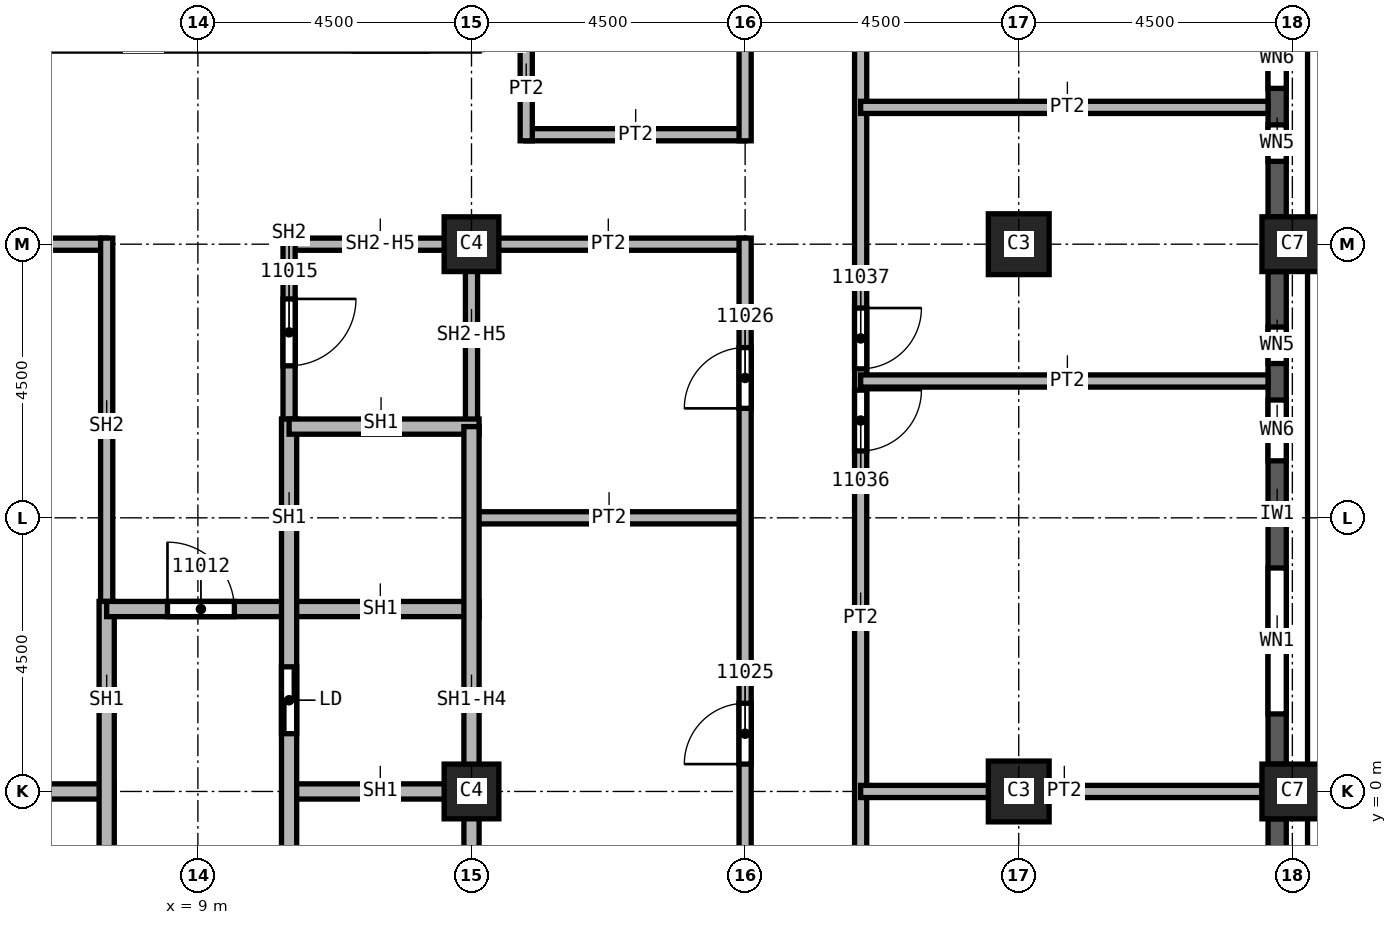
"""IFC4 building model, lengths in metres.
Left out: names, types, materials, properties, quantities, classifications, styles, units other than length and angle.
Written with IfcOpenShell. Run it as: python <this file> out.ifc"""

import sys

from ifc_helpers import new_model, si_unit, direction, frame, frame_2d, origin, origin_2d, place, context, subcontext, project, spatial, rectangle, extrude, element, fill, save


model = new_model("IFC4")
c1 = context("Model", 3, precision=1e-05, world=origin(), true_north=direction((0.0, 1.0)))
c2 = subcontext(c1, "Body", "Model", "MODEL_VIEW")
j1 = project(units=[si_unit("LENGTHUNIT", "METRE"), si_unit("PLANEANGLEUNIT", "RADIAN")], contexts=[c1])
p1 = place(None, origin())
s1 = spatial("IfcSite", under=j1, at=p1, CompositionType="ELEMENT")
p2 = place(p1, origin())
s2 = spatial("IfcBuilding", under=s1, at=p2, CompositionType="ELEMENT")
p3 = place(p2, frame((0.0, 0.0, 184.0)))
s3 = spatial("IfcBuildingStorey", under=s2, at=p3, CompositionType="ELEMENT", Elevation=184.0)
for number, where, z_axis, x_axis in (
    (1, (22.5, 0.0, 0.0), (0.0, 0.0, 1.0), (1.0, 0.0, 0.0)),
    (2, (22.5, 9.0, 0.0), (0.0, 0.0, 1.0), (1.0, 0.0, 0.0)),
):
    element("IfcColumn", number, at=place(p3, frame(where, z_axis=z_axis, x_axis=x_axis)), inside=s3, PredefinedType="COLUMN", context=c2, shape_type="SweptSolid", body=[
        extrude(rectangle(XDim=1.0, YDim=1.0, at=origin_2d()), origin(), (0.0, 0.0, 1.0), 3.72),
    ])
for number, where, z_axis, x_axis in (
    (3, (13.5, 0.0, 0.0), (0.0, 0.0, 1.0), (1.0, 0.0, 0.0)),
    (4, (13.5, 9.0, 0.0), (0.0, 0.0, 1.0), (1.0, 0.0, 0.0)),
):
    element("IfcColumn", number, at=place(p3, frame(where, z_axis=z_axis, x_axis=x_axis)), inside=s3, PredefinedType="COLUMN", context=c2, shape_type="SweptSolid", body=[
        extrude(rectangle(XDim=0.9, YDim=0.9, at=origin_2d()), origin(), (0.0, 0.0, 1.0), 3.72),
    ])
for number, where, z_axis, x_axis in (
    (5, (27.0, 0.0, 0.0), (0.0, 0.0, 1.0), (0.0, 1.0, 0.0)),
    (6, (27.0, 9.0, 0.0), (0.0, 0.0, 1.0), (0.0, 1.0, 0.0)),
):
    element("IfcColumn", number, at=place(p3, frame(where, z_axis=z_axis, x_axis=x_axis)), inside=s3, PredefinedType="COLUMN", context=c2, shape_type="SweptSolid", body=[
        extrude(rectangle(XDim=0.9, YDim=1.0, at=origin_2d()), origin(), (0.0, 0.0, 1.0), 3.72),
    ])
p4 = place(p3, frame((26.75, -0.45, 0.0), z_axis=(0.0, 0.0, 1.0), x_axis=(0.0, -1.0, 0.0)))
e7 = element("IfcWall", 7, at=p4, inside=s3, PredefinedType="SOLIDWALL", context=c2, shape_type="SweptSolid", body=[
    extrude(rectangle(XDim=8.1, YDim=0.3, at=frame_2d((4.05, 0.0))), origin(), (0.0, 0.0, 1.0), 3.12),
])
p5 = place(p4, frame((3.45, 0.0, 0.0)))
e8 = element("IfcOpeningElement", 8, at=p5, cuts=e7, PredefinedType="OPENING", context=c2, shape_type="SweptSolid", body=[
    extrude(rectangle(XDim=1.2, YDim=2.4, at=frame_2d((0.6, 1.2))), frame((0.0, 0.15, 0.0), z_axis=(0.0, -1.0, 0.0), x_axis=(1.0, 0.0, 0.0)), (0.0, 0.0, 1.0), 0.3),
])
p6 = place(p3, frame((26.75, 0.45, 0.0), z_axis=(0.0, 0.0, 1.0), x_axis=(0.0, 1.0, 0.0)))
e9 = element("IfcWall", 9, at=p6, inside=s3, PredefinedType="SOLIDWALL", context=c2, shape_type="SweptSolid", body=[
    extrude(rectangle(XDim=8.1, YDim=0.3, at=frame_2d((4.05, 0.0))), origin(), (0.0, 0.0, 1.0), 3.12),
])
p7 = place(p6, frame((0.825, 0.0, 0.8)))
e10 = element("IfcOpeningElement", 10, at=p7, cuts=e9, PredefinedType="OPENING", context=c2, shape_type="SweptSolid", body=[
    extrude(rectangle(XDim=2.4, YDim=1.95, at=frame_2d((1.2, 0.975))), frame((0.0, 0.15, 0.0), z_axis=(0.0, -1.0, 0.0), x_axis=(1.0, 0.0, 0.0)), (0.0, 0.0, 1.0), 0.3),
])
p8 = place(p6, frame((4.988, 0.0, 0.8)))
e11 = element("IfcOpeningElement", 11, at=p8, cuts=e9, PredefinedType="OPENING", context=c2, shape_type="SweptSolid", body=[
    extrude(rectangle(XDim=1.0, YDim=1.95, at=frame_2d((0.5, 0.975))), frame((0.0, 0.15, 0.0), z_axis=(0.0, -1.0, 0.0), x_axis=(1.0, 0.0, 0.0)), (0.0, 0.0, 1.0), 0.3),
])
p9 = place(p6, frame((6.587, 0.0, 0.8)))
e12 = element("IfcOpeningElement", 12, at=p9, cuts=e9, PredefinedType="OPENING", context=c2, shape_type="SweptSolid", body=[
    extrude(rectangle(XDim=0.6, YDim=1.95, at=frame_2d((0.3, 0.975))), frame((0.0, 0.15, 0.0), z_axis=(0.0, -1.0, 0.0), x_axis=(1.0, 0.0, 0.0)), (0.0, 0.0, 1.0), 0.3),
])
p10 = place(p3, frame((26.75, 9.45, 0.0), z_axis=(0.0, 0.0, 1.0), x_axis=(0.0, 1.0, 0.0)))
e13 = element("IfcWall", 13, at=p10, inside=s3, PredefinedType="SOLIDWALL", context=c2, shape_type="SweptSolid", body=[
    extrude(rectangle(XDim=8.1, YDim=0.3, at=frame_2d((4.05, 0.0))), origin(), (0.0, 0.0, 1.0), 3.12),
])
p11 = place(p10, frame((4.875, 0.0, 0.8)))
e14 = element("IfcOpeningElement", 14, at=p11, cuts=e13, PredefinedType="OPENING", context=c2, shape_type="SweptSolid", body=[
    extrude(rectangle(XDim=2.4, YDim=1.95, at=frame_2d((1.2, 0.975))), frame((0.0, 0.15, 0.0), z_axis=(0.0, -1.0, 0.0), x_axis=(1.0, 0.0, 0.0)), (0.0, 0.0, 1.0), 0.3),
])
p12 = place(p10, frame((0.913, 0.0, 0.8)))
e15 = element("IfcOpeningElement", 15, at=p12, cuts=e13, PredefinedType="OPENING", context=c2, shape_type="SweptSolid", body=[
    extrude(rectangle(XDim=0.6, YDim=1.95, at=frame_2d((0.3, 0.975))), frame((0.0, 0.15, 0.0), z_axis=(0.0, -1.0, 0.0), x_axis=(1.0, 0.0, 0.0)), (0.0, 0.0, 1.0), 0.3),
])
p13 = place(p10, frame((2.113, 0.0, 0.8)))
e16 = element("IfcOpeningElement", 16, at=p13, cuts=e13, PredefinedType="OPENING", context=c2, shape_type="SweptSolid", body=[
    extrude(rectangle(XDim=1.0, YDim=1.95, at=frame_2d((0.5, 0.975))), frame((0.0, 0.15, 0.0), z_axis=(0.0, -1.0, 0.0), x_axis=(1.0, 0.0, 0.0)), (0.0, 0.0, 1.0), 0.3),
])
for number, where, z_axis, x_axis in (
    (17, (13.5, 4.5, 0.0), (0.0, 0.0, 1.0), (1.0, 0.0, 0.0)),
    (18, (18.0, 9.0, 0.0), (0.0, 0.0, 1.0), (-1.0, 0.0, 0.0)),
):
    element("IfcWall", number, at=place(p3, frame(where, z_axis=z_axis, x_axis=x_axis)), inside=s3, PredefinedType="PARTITIONING", context=c2, shape_type="SweptSolid", body=[
        extrude(rectangle(XDim=4.5, YDim=0.2, at=frame_2d((2.25, 0.0))), origin(), (0.0, 0.0, 1.0), 3.72),
    ])
p14 = place(p3, frame((14.4, 10.8, 0.0), z_axis=(0.0, 0.0, 1.0), x_axis=(1.0, 0.0, 0.0)))
e19 = element("IfcWall", 19, at=p14, inside=s3, PredefinedType="PARTITIONING", context=c2, shape_type="SweptSolid", body=[
    extrude(rectangle(XDim=3.6, YDim=0.2, at=frame_2d((1.8, 0.0))), origin(), (0.0, 0.0, 1.0), 3.72),
])
p15 = place(p3, frame((14.4, 12.3, 0.0), z_axis=(0.0, 0.0, 1.0), x_axis=(0.0, -1.0, 0.0)))
e20 = element("IfcWall", 20, at=p15, inside=s3, PredefinedType="PARTITIONING", context=c2, shape_type="SweptSolid", body=[
    extrude(rectangle(XDim=1.6, YDim=0.2, at=frame_2d((0.8, 0.0))), origin(), (0.0, 0.0, 1.0), 3.72),
])
p16 = place(p3, frame((18.0, -8.7, 0.0), z_axis=(0.0, 0.0, 1.0), x_axis=(0.0, 1.0, 0.0)))
e21 = element("IfcWall", 21, at=p16, inside=s3, PredefinedType="PARTITIONING", context=c2, shape_type="SweptSolid", body=[
    extrude(rectangle(XDim=17.8, YDim=0.2, at=frame_2d((8.9, 0.0))), origin(), (0.0, 0.0, 1.0), 3.72),
])
p17 = place(p16, frame((2.95, 0.0, 0.0)))
e22 = element("IfcOpeningElement", 22, at=p17, cuts=e21, PredefinedType="OPENING", context=c2, shape_type="SweptSolid", body=[
    extrude(rectangle(XDim=1.0, YDim=2.1, at=frame_2d((0.5, 1.05))), frame((0.0, 0.1, 0.0), z_axis=(0.0, -1.0, 0.0), x_axis=(1.0, 0.0, 0.0)), (0.0, 0.0, 1.0), 0.2),
])
p18 = place(p16, frame((9.15, 0.0, 0.0)))
e23 = element("IfcOpeningElement", 23, at=p18, cuts=e21, PredefinedType="OPENING", context=c2, shape_type="SweptSolid", body=[
    extrude(rectangle(XDim=1.0, YDim=2.1, at=frame_2d((0.5, 1.05))), frame((0.0, 0.1, 0.0), z_axis=(0.0, -1.0, 0.0), x_axis=(1.0, 0.0, 0.0)), (0.0, 0.0, 1.0), 0.2),
])
p19 = place(p16, frame((15.0, 0.0, 0.0)))
e24 = element("IfcOpeningElement", 24, at=p19, cuts=e21, PredefinedType="OPENING", context=c2, shape_type="SweptSolid", body=[
    extrude(rectangle(XDim=1.0, YDim=2.1, at=frame_2d((0.5, 1.05))), frame((0.0, 0.1, 0.0), z_axis=(0.0, -1.0, 0.0), x_axis=(1.0, 0.0, 0.0)), (0.0, 0.0, 1.0), 0.2),
])
p20 = place(p3, frame((18.0, 10.7, 0.0), z_axis=(0.0, 0.0, 1.0), x_axis=(0.0, 1.0, 0.0)))
e25 = element("IfcWall", 25, at=p20, inside=s3, PredefinedType="PARTITIONING", context=c2, shape_type="SweptSolid", body=[
    extrude(rectangle(XDim=11.6, YDim=0.2, at=frame_2d((5.8, 0.0))), origin(), (0.0, 0.0, 1.0), 3.72),
])
p21 = place(p20, frame((4.25, 0.0, 0.0)))
e26 = element("IfcOpeningElement", 26, at=p21, cuts=e25, PredefinedType="OPENING", context=c2, shape_type="SweptSolid", body=[
    extrude(rectangle(XDim=1.0, YDim=2.1, at=frame_2d((0.5, 1.05))), frame((0.0, 0.1, 0.0), z_axis=(0.0, -1.0, 0.0), x_axis=(1.0, 0.0, 0.0)), (0.0, 0.0, 1.0), 0.2),
])
p22 = place(p3, frame((19.9, 22.4, 0.0), z_axis=(0.0, 0.0, 1.0), x_axis=(0.0, -1.0, 0.0)))
e27 = element("IfcWall", 27, at=p22, inside=s3, PredefinedType="PARTITIONING", context=c2, shape_type="SweptSolid", body=[
    extrude(rectangle(XDim=31.1, YDim=0.2, at=frame_2d((15.55, 0.0))), origin(), (0.0, 0.0, 1.0), 3.72),
])
p23 = place(p22, frame((15.8, 0.0, 0.0)))
e28 = element("IfcOpeningElement", 28, at=p23, cuts=e27, PredefinedType="OPENING", context=c2, shape_type="SweptSolid", body=[
    extrude(rectangle(XDim=1.0, YDim=2.1, at=frame_2d((0.5, 1.05))), frame((0.0, 0.1, 0.0), z_axis=(0.0, -1.0, 0.0), x_axis=(1.0, 0.0, 0.0)), (0.0, 0.0, 1.0), 0.2),
])
p24 = place(p22, frame((14.45, 0.0, 0.0)))
e29 = element("IfcOpeningElement", 29, at=p24, cuts=e27, PredefinedType="OPENING", context=c2, shape_type="SweptSolid", body=[
    extrude(rectangle(XDim=1.0, YDim=2.1, at=frame_2d((0.5, 1.05))), frame((0.0, 0.1, 0.0), z_axis=(0.0, -1.0, 0.0), x_axis=(1.0, 0.0, 0.0)), (0.0, 0.0, 1.0), 0.2),
])
p25 = place(p22, frame((7.0, 0.0, 0.0)))
e30 = element("IfcOpeningElement", 30, at=p25, cuts=e27, PredefinedType="OPENING", context=c2, shape_type="SweptSolid", body=[
    extrude(rectangle(XDim=1.0, YDim=2.1, at=frame_2d((0.5, 1.05))), frame((0.0, 0.1, 0.0), z_axis=(0.0, -1.0, 0.0), x_axis=(1.0, 0.0, 0.0)), (0.0, 0.0, 1.0), 0.2),
])
p26 = place(p22, frame((27.05, 0.0, 0.0)))
e31 = element("IfcOpeningElement", 31, at=p26, cuts=e27, PredefinedType="OPENING", context=c2, shape_type="SweptSolid", body=[
    extrude(rectangle(XDim=1.0, YDim=2.1, at=frame_2d((0.5, 1.05))), frame((0.0, 0.1, 0.0), z_axis=(0.0, -1.0, 0.0), x_axis=(1.0, 0.0, 0.0)), (0.0, 0.0, 1.0), 0.2),
])
for number, where, z_axis, x_axis in (
    (32, (19.9, 6.75, 0.0), (0.0, 0.0, 1.0), (1.0, 0.0, 0.0)),
    (33, (19.9, 11.25, 0.0), (0.0, 0.0, 1.0), (1.0, 0.0, 0.0)),
):
    element("IfcWall", number, at=place(p3, frame(where, z_axis=z_axis, x_axis=x_axis)), inside=s3, PredefinedType="PARTITIONING", context=c2, shape_type="SweptSolid", body=[
        extrude(rectangle(XDim=6.7, YDim=0.2, at=frame_2d((3.35, 0.0))), origin(), (0.0, 0.0, 1.0), 3.72),
    ])
p27 = place(p3, frame((26.5, 0.0, 0.0), z_axis=(0.0, 0.0, 1.0), x_axis=(-1.0, 0.0, 0.0)))
e34 = element("IfcWall", 34, at=p27, inside=s3, PredefinedType="PARTITIONING", context=c2, shape_type="SweptSolid", body=[
    extrude(rectangle(XDim=6.6, YDim=0.2, at=frame_2d((3.3, 0.0))), origin(), (0.0, 0.0, 1.0), 3.72),
])
p28 = place(p3, frame((4.5, 9.0, 0.0), z_axis=(0.0, 0.0, 1.0), x_axis=(1.0, 0.0, 0.0)))
e35 = element("IfcWall", 35, at=p28, inside=s3, PredefinedType="SOLIDWALL", context=c2, shape_type="SweptSolid", body=[
    extrude(rectangle(XDim=3.0, YDim=0.2, at=frame_2d((1.5, 0.0))), origin(), (0.0, 0.0, 1.0), 2.958),
])
p29 = place(p3, frame((7.5, 9.1, 0.0), z_axis=(0.0, 0.0, 1.0), x_axis=(0.0, -1.0, 0.0)))
e36 = element("IfcWall", 36, at=p29, inside=s3, PredefinedType="SOLIDWALL", context=c2, shape_type="SweptSolid", body=[
    extrude(rectangle(XDim=6.225, YDim=0.2, at=frame_2d((3.113, 0.0))), origin(), (0.0, 0.0, 1.0), 3.72),
])
p30 = place(p3, frame((10.5, 9.0, 0.0), z_axis=(0.0, 0.0, 1.0), x_axis=(1.0, 0.0, 0.0)))
e37 = element("IfcWall", 37, at=p30, inside=s3, PredefinedType="SOLIDWALL", context=c2, shape_type="SweptSolid", body=[
    extrude(rectangle(XDim=3.1, YDim=0.2, at=frame_2d((1.55, 0.0))), origin(), (0.0, 0.0, 1.0), 2.958),
])
p31 = place(p3, frame((10.5, 9.1, 0.0), z_axis=(0.0, 0.0, 1.0), x_axis=(0.0, -1.0, 0.0)))
e38 = element("IfcWall", 38, at=p31, inside=s3, PredefinedType="SOLIDWALL", context=c2, shape_type="SweptSolid", body=[
    extrude(rectangle(XDim=3.225, YDim=0.2, at=frame_2d((1.613, 0.0))), origin(), (0.0, 0.0, 1.0), 3.72),
])
p32 = place(p31, frame((1.0, 0.0, 0.0)))
e39 = element("IfcOpeningElement", 39, at=p32, cuts=e38, PredefinedType="OPENING", context=c2, shape_type="SweptSolid", body=[
    extrude(rectangle(XDim=1.1, YDim=2.1, at=frame_2d((0.55, 1.05))), frame((0.0, 0.1, 0.0), z_axis=(0.0, -1.0, 0.0), x_axis=(1.0, 0.0, 0.0)), (0.0, 0.0, 1.0), 0.2),
])
p33 = place(p3, frame((13.5, 9.1, 0.0), z_axis=(0.0, 0.0, 1.0), x_axis=(0.0, -1.0, 0.0)))
e40 = element("IfcWall", 40, at=p33, inside=s3, PredefinedType="SOLIDWALL", context=c2, shape_type="SweptSolid", body=[
    extrude(rectangle(XDim=3.1, YDim=0.2, at=frame_2d((1.55, 0.0))), origin(), (0.0, 0.0, 1.0), 2.958),
])
p34 = place(p3, frame((4.375, 0.0, 0.0), z_axis=(0.0, 0.0, 1.0), x_axis=(1.0, 0.0, 0.0)))
e41 = element("IfcWall", 41, at=p34, inside=s3, PredefinedType="SOLIDWALL", context=c2, shape_type="SweptSolid", body=[
    extrude(rectangle(XDim=3.25, YDim=0.25, at=frame_2d((1.625, 0.0))), origin(), (0.0, 0.0, 1.0), 3.72),
])
p35 = place(p3, frame((7.5, 3.125, 0.0), z_axis=(0.0, 0.0, 1.0), x_axis=(0.0, -1.0, 0.0)))
e42 = element("IfcWall", 42, at=p35, inside=s3, PredefinedType="SOLIDWALL", context=c2, shape_type="SweptSolid", body=[
    extrude(rectangle(XDim=9.125, YDim=0.25, at=frame_2d((4.562, 0.0))), origin(), (0.0, 0.0, 1.0), 3.72),
])
p36 = place(p3, frame((7.5, 3.0, 0.0), z_axis=(0.0, 0.0, 1.0), x_axis=(1.0, 0.0, 0.0)))
e43 = element("IfcWall", 43, at=p36, inside=s3, PredefinedType="SOLIDWALL", context=c2, shape_type="SweptSolid", body=[
    extrude(rectangle(XDim=6.125, YDim=0.25, at=frame_2d((3.062, 0.0))), origin(), (0.0, 0.0, 1.0), 3.72),
])
p37 = place(p36, frame((1.0, 0.0, 0.0)))
e44 = element("IfcOpeningElement", 44, at=p37, cuts=e43, PredefinedType="OPENING", context=c2, shape_type="SweptSolid", body=[
    extrude(rectangle(XDim=1.1, YDim=2.1, at=frame_2d((0.55, 1.05))), frame((0.0, 0.125, 0.0), z_axis=(0.0, -1.0, 0.0), x_axis=(1.0, 0.0, 0.0)), (0.0, 0.0, 1.0), 0.25),
])
p38 = place(p3, frame((10.5, 0.0, 0.0), z_axis=(0.0, 0.0, 1.0), x_axis=(1.0, 0.0, 0.0)))
e45 = element("IfcWall", 45, at=p38, inside=s3, PredefinedType="SOLIDWALL", context=c2, shape_type="SweptSolid", body=[
    extrude(rectangle(XDim=3.125, YDim=0.25, at=frame_2d((1.562, 0.0))), origin(), (0.0, 0.0, 1.0), 3.72),
])
p39 = place(p3, frame((10.5, 6.125, 0.0), z_axis=(0.0, 0.0, 1.0), x_axis=(0.0, -1.0, 0.0)))
e46 = element("IfcWall", 46, at=p39, inside=s3, PredefinedType="SOLIDWALL", context=c2, shape_type="SweptSolid", body=[
    extrude(rectangle(XDim=9.25, YDim=0.25, at=frame_2d((4.625, 0.0))), origin(), (0.0, 0.0, 1.0), 3.72),
])
p40 = place(p39, frame((7.075, 0.0, 0.0)))
e47 = element("IfcOpeningElement", 47, at=p40, cuts=e46, PredefinedType="OPENING", context=c2, shape_type="SweptSolid", body=[
    extrude(rectangle(XDim=1.1, YDim=2.1, at=frame_2d((0.55, 1.05))), frame((0.0, 0.125, 0.0), z_axis=(0.0, -1.0, 0.0), x_axis=(1.0, 0.0, 0.0)), (0.0, 0.0, 1.0), 0.25),
])
p41 = place(p39, frame((4.075, 0.0, 0.0)))
e48 = element("IfcOpeningElement", 48, at=p41, cuts=e46, PredefinedType="OPENING", context=c2, shape_type="SweptSolid", body=[
    extrude(rectangle(XDim=1.1, YDim=2.1, at=frame_2d((0.55, 1.05))), frame((0.0, 0.125, 0.0), z_axis=(0.0, -1.0, 0.0), x_axis=(1.0, 0.0, 0.0)), (0.0, 0.0, 1.0), 0.25),
])
p42 = place(p3, frame((10.5, 6.0, 0.0), z_axis=(0.0, 0.0, 1.0), x_axis=(1.0, 0.0, 0.0)))
e49 = element("IfcWall", 49, at=p42, inside=s3, PredefinedType="SOLIDWALL", context=c2, shape_type="SweptSolid", body=[
    extrude(rectangle(XDim=3.125, YDim=0.25, at=frame_2d((1.562, 0.0))), origin(), (0.0, 0.0, 1.0), 3.72),
])
p43 = place(p3, frame((13.5, 6.0, 0.0), z_axis=(0.0, 0.0, 1.0), x_axis=(0.0, -1.0, 0.0)))
e50 = element("IfcWall", 50, at=p43, inside=s3, PredefinedType="SOLIDWALL", context=c2, shape_type="SweptSolid", body=[
    extrude(rectangle(XDim=9.0, YDim=0.25, at=frame_2d((4.5, 0.0))), origin(), (0.0, 0.0, 1.0), 2.958),
])
p44 = place(p7, origin())
e51 = element("IfcWindow", 51, at=p44, inside=s3, PartitioningType="SINGLE_PANEL", PredefinedType="WINDOW", context=c2, shape_type="SweptSolid", body=[
    extrude(rectangle(XDim=2.4, YDim=1.95, at=frame_2d((1.2, 0.975))), frame((0.0, 0.03, 0.0), z_axis=(0.0, -1.0, 0.0), x_axis=(1.0, 0.0, 0.0)), (0.0, 0.0, 1.0), 0.06),
])
fill(e10, e51)
p45 = place(p37, origin())
e52 = element("IfcDoor", 52, at=p45, inside=s3, OperationType="SINGLE_SWING_LEFT", PredefinedType="DOOR", context=c2, shape_type="SweptSolid", body=[
    extrude(rectangle(XDim=1.1, YDim=2.1, at=frame_2d((0.55, 1.05))), frame((0.0, 0.025, 0.0), z_axis=(0.0, -1.0, 0.0), x_axis=(1.0, 0.0, 0.0)), (0.0, 0.0, 1.0), 0.05),
])
fill(e44, e52)
p46 = place(p32, origin())
e53 = element("IfcDoor", 53, at=p46, inside=s3, OperationType="SINGLE_SWING_RIGHT", PredefinedType="DOOR", context=c2, shape_type="SweptSolid", body=[
    extrude(rectangle(XDim=1.1, YDim=2.1, at=frame_2d((0.55, 1.05))), frame((0.0, 0.025, 0.0), z_axis=(0.0, -1.0, 0.0), x_axis=(1.0, 0.0, 0.0)), (0.0, 0.0, 1.0), 0.05),
])
fill(e39, e53)
p47 = place(p18, origin())
e54 = element("IfcDoor", 54, at=p47, inside=s3, OperationType="SINGLE_SWING_RIGHT", PredefinedType="DOOR", context=c2, shape_type="SweptSolid", body=[
    extrude(rectangle(XDim=1.0, YDim=2.1, at=frame_2d((0.5, 1.05))), frame((0.0, 0.025, 0.0), z_axis=(0.0, -1.0, 0.0), x_axis=(1.0, 0.0, 0.0)), (0.0, 0.0, 1.0), 0.05),
])
fill(e23, e54)
p48 = place(p19, origin())
e55 = element("IfcDoor", 55, at=p48, inside=s3, OperationType="SINGLE_SWING_LEFT", PredefinedType="DOOR", context=c2, shape_type="SweptSolid", body=[
    extrude(rectangle(XDim=1.0, YDim=2.1, at=frame_2d((0.5, 1.05))), frame((0.0, 0.025, 0.0), z_axis=(0.0, -1.0, 0.0), x_axis=(1.0, 0.0, 0.0)), (0.0, 0.0, 1.0), 0.05),
])
fill(e24, e55)
p49 = place(p23, origin())
e56 = element("IfcDoor", 56, at=p49, inside=s3, OperationType="SINGLE_SWING_LEFT", PredefinedType="DOOR", context=c2, shape_type="SweptSolid", body=[
    extrude(rectangle(XDim=1.0, YDim=2.1, at=frame_2d((0.5, 1.05))), frame((0.0, 0.025, 0.0), z_axis=(0.0, -1.0, 0.0), x_axis=(1.0, 0.0, 0.0)), (0.0, 0.0, 1.0), 0.05),
])
fill(e28, e56)
p50 = place(p24, origin())
e57 = element("IfcDoor", 57, at=p50, inside=s3, OperationType="SINGLE_SWING_RIGHT", PredefinedType="DOOR", context=c2, shape_type="SweptSolid", body=[
    extrude(rectangle(XDim=1.0, YDim=2.1, at=frame_2d((0.5, 1.05))), frame((0.0, 0.025, 0.0), z_axis=(0.0, -1.0, 0.0), x_axis=(1.0, 0.0, 0.0)), (0.0, 0.0, 1.0), 0.05),
])
fill(e29, e57)
p51 = place(p41, origin())
e58 = element("IfcDoor", 58, at=p51, inside=s3, OperationType="SLIDING_TO_LEFT", PredefinedType="DOOR", context=c2, shape_type="SweptSolid", body=[
    extrude(rectangle(XDim=1.1, YDim=2.1, at=frame_2d((0.55, 1.05))), frame((0.0, 0.025, 0.0), z_axis=(0.0, -1.0, 0.0), x_axis=(1.0, 0.0, 0.0)), (0.0, 0.0, 1.0), 0.05),
])
fill(e48, e58)
p52 = place(p8, origin())
e59 = element("IfcWindow", 59, at=p52, inside=s3, PartitioningType="SINGLE_PANEL", PredefinedType="WINDOW", context=c2, shape_type="SweptSolid", body=[
    extrude(rectangle(XDim=1.0, YDim=1.95, at=frame_2d((0.5, 0.975))), frame((0.0, 0.03, 0.0), z_axis=(0.0, -1.0, 0.0), x_axis=(1.0, 0.0, 0.0)), (0.0, 0.0, 1.0), 0.06),
])
fill(e11, e59)
p53 = place(p9, origin())
e60 = element("IfcWindow", 60, at=p53, inside=s3, PartitioningType="SINGLE_PANEL", PredefinedType="WINDOW", context=c2, shape_type="SweptSolid", body=[
    extrude(rectangle(XDim=0.6, YDim=1.95, at=frame_2d((0.3, 0.975))), frame((0.0, 0.03, 0.0), z_axis=(0.0, -1.0, 0.0), x_axis=(1.0, 0.0, 0.0)), (0.0, 0.0, 1.0), 0.06),
])
fill(e12, e60)
p54 = place(p12, origin())
e61 = element("IfcWindow", 61, at=p54, inside=s3, PartitioningType="SINGLE_PANEL", PredefinedType="WINDOW", context=c2, shape_type="SweptSolid", body=[
    extrude(rectangle(XDim=0.6, YDim=1.95, at=frame_2d((0.3, 0.975))), frame((0.0, 0.03, 0.0), z_axis=(0.0, -1.0, 0.0), x_axis=(1.0, 0.0, 0.0)), (0.0, 0.0, 1.0), 0.06),
])
fill(e15, e61)
p55 = place(p13, origin())
e62 = element("IfcWindow", 62, at=p55, inside=s3, PartitioningType="SINGLE_PANEL", PredefinedType="WINDOW", context=c2, shape_type="SweptSolid", body=[
    extrude(rectangle(XDim=1.0, YDim=1.95, at=frame_2d((0.5, 0.975))), frame((0.0, 0.03, 0.0), z_axis=(0.0, -1.0, 0.0), x_axis=(1.0, 0.0, 0.0)), (0.0, 0.0, 1.0), 0.06),
])
fill(e16, e62)
save(model, sys.argv[1])
